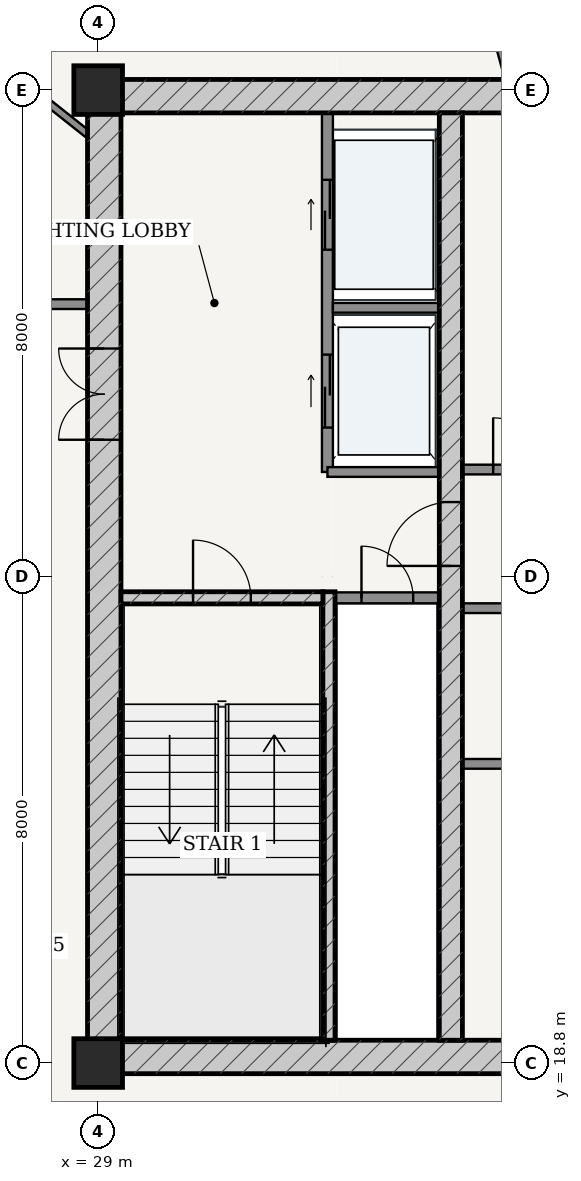
"""IFC4 building model, lengths in metres.
Left out: names, types, materials, properties, quantities, classifications, styles, units other than length and angle.
Written with IfcOpenShell. Run it as: python <this file> out.ifc"""

import sys

from ifc_helpers import new_model, si_unit, direction, frame, frame_2d, origin, origin_2d, place, context, subcontext, project, spatial, rectangle, extrude, source, transform, mapped, element, fill, save


model = new_model("IFC4")
c1 = context("Model", 3, precision=1e-05, world=origin(), true_north=direction((-0.2419218956, 0.970295726276)))
c2 = subcontext(c1, "Body", "Model", "MODEL_VIEW")
j1 = project(units=[si_unit("LENGTHUNIT", "METRE"), si_unit("PLANEANGLEUNIT", "RADIAN")], contexts=[c1])
p1 = place(None, origin())
s1 = spatial("IfcSite", under=j1, at=p1, CompositionType="ELEMENT")
p2 = place(p1, origin())
s2 = spatial("IfcBuilding", under=s1, at=p2, CompositionType="ELEMENT")
p3 = place(p2, frame((0.0, 0.0, 285.7)))
s3 = spatial("IfcBuildingStorey", under=s2, at=p3, CompositionType="ELEMENT", Elevation=285.7)
for number, where, z_axis, x_axis in (
    (1, (29.0, 18.8, 0.0), (0.0, 0.0, 1.0), (1.0, 0.0, 0.0)),
    (2, (29.0, 34.8, 0.0), (0.0, 0.0, 1.0), (1.0, 0.0, 0.0)),
):
    element("IfcColumn", number, at=place(p3, frame(where, z_axis=z_axis, x_axis=x_axis)), inside=s3, PredefinedType="COLUMN", context=c2, shape_type="SweptSolid", body=[
        extrude(rectangle(XDim=0.8, YDim=0.8, at=origin_2d()), origin(), (0.0, 0.0, 1.0), 3.75),
    ])
p4 = place(p3, frame((28.825, 18.9, 0.0), z_axis=(0.0, 0.0, 1.0), x_axis=(1.0, 0.0, 0.0)))
e3 = element("IfcWall", 3, at=p4, inside=s3, PredefinedType="SHEAR", context=c2, shape_type="SweptSolid", body=[
    extrude(rectangle(XDim=18.35, YDim=0.55, at=frame_2d((9.175, 0.0))), origin(), (0.0, 0.0, 1.0), 3.49),
])
p5 = place(p4, frame((7.41, 0.0, 0.0)))
e4 = element("IfcOpeningElement", 4, at=p5, cuts=e3, PredefinedType="OPENING", context=c2, shape_type="SweptSolid", body=[
    extrude(rectangle(XDim=0.85, YDim=2.1, at=frame_2d((0.425, 1.05))), frame((0.0, 0.285, 0.0), z_axis=(0.0, -1.0, 0.0), x_axis=(1.0, 0.0, 0.0)), (0.0, 0.0, 1.0), 0.57),
])
p6 = place(p4, frame((10.49, 0.0, 0.0)))
e5 = element("IfcOpeningElement", 5, at=p6, cuts=e3, PredefinedType="OPENING", context=c2, shape_type="SweptSolid", body=[
    extrude(rectangle(XDim=0.85, YDim=2.1, at=frame_2d((0.425, 1.05))), frame((0.0, 0.285, 0.0), z_axis=(0.0, -1.0, 0.0), x_axis=(1.0, 0.0, 0.0)), (0.0, 0.0, 1.0), 0.57),
])
p7 = place(p3, frame((28.825, 34.7, 0.0), z_axis=(0.0, 0.0, 1.0), x_axis=(1.0, 0.0, 0.0)))
e6 = element("IfcWall", 6, at=p7, inside=s3, PredefinedType="SHEAR", context=c2, shape_type="SweptSolid", body=[
    extrude(rectangle(XDim=18.35, YDim=0.55, at=frame_2d((9.175, 0.0))), origin(), (0.0, 0.0, 1.0), 3.49),
])
p8 = place(p3, frame((29.1, 19.175, 0.0), z_axis=(0.0, 0.0, 1.0), x_axis=(0.0, 1.0, 0.0)))
e7 = element("IfcWall", 7, at=p8, inside=s3, PredefinedType="SHEAR", context=c2, shape_type="SweptSolid", body=[
    extrude(rectangle(XDim=15.25, YDim=0.55, at=frame_2d((7.625, 0.0))), origin(), (0.0, 0.0, 1.0), 3.49),
])
p9 = place(p8, frame((9.875, 0.0, 0.0)))
e8 = element("IfcOpeningElement", 8, at=p9, cuts=e7, PredefinedType="OPENING", context=c2, shape_type="SweptSolid", body=[
    extrude(rectangle(XDim=1.5, YDim=2.2, at=frame_2d((0.75, 1.1))), frame((0.0, 0.285, 0.0), z_axis=(0.0, -1.0, 0.0), x_axis=(1.0, 0.0, 0.0)), (0.0, 0.0, 1.0), 0.57),
])
p10 = place(p3, frame((32.795, 19.175, 0.0), z_axis=(0.0, 0.0, 1.0), x_axis=(0.0, 1.0, 0.0)))
e9 = element("IfcWall", 9, at=p10, inside=s3, PredefinedType="SOLIDWALL", context=c2, shape_type="SweptSolid", body=[
    extrude(rectangle(XDim=7.375, YDim=0.2, at=frame_2d((3.688, 0.0))), origin(), (0.0, 0.0, 1.0), 3.49),
])
p11 = place(p3, frame((29.375, 26.45, 0.0), z_axis=(0.0, 0.0, 1.0), x_axis=(1.0, 0.0, 0.0)))
e10 = element("IfcWall", 10, at=p11, inside=s3, PredefinedType="SOLIDWALL", context=c2, shape_type="SweptSolid", body=[
    extrude(rectangle(XDim=3.32, YDim=0.2, at=frame_2d((1.66, 0.0))), origin(), (0.0, 0.0, 1.0), 3.49),
])
p12 = place(p11, frame((1.185, 0.0, 0.0)))
e11 = element("IfcOpeningElement", 11, at=p12, cuts=e10, PredefinedType="OPENING", context=c2, shape_type="SweptSolid", body=[
    extrude(rectangle(XDim=0.95, YDim=2.15, at=frame_2d((0.475, 1.075))), frame((0.0, 0.11, 0.0), z_axis=(0.0, -1.0, 0.0), x_axis=(1.0, 0.0, 0.0)), (0.0, 0.0, 1.0), 0.22),
])
p13 = place(p3, frame((34.8, 19.175, 0.0), z_axis=(0.0, 0.0, 1.0), x_axis=(0.0, 1.0, 0.0)))
e12 = element("IfcWall", 12, at=p13, inside=s3, PredefinedType="SHEAR", context=c2, shape_type="SweptSolid", body=[
    extrude(rectangle(XDim=15.25, YDim=0.38, at=frame_2d((7.625, 0.0))), origin(), (0.0, 0.0, 1.0), 3.49),
])
p14 = place(p13, frame((7.8, 0.0, 0.0)))
e13 = element("IfcOpeningElement", 13, at=p14, cuts=e12, PredefinedType="OPENING", context=c2, shape_type="SweptSolid", body=[
    extrude(rectangle(XDim=1.05, YDim=2.15, at=frame_2d((0.525, 1.075))), frame((0.0, 0.2, 0.0), z_axis=(0.0, -1.0, 0.0), x_axis=(1.0, 0.0, 0.0)), (0.0, 0.0, 1.0), 0.4),
])
p15 = place(p3, frame((32.9, 26.45, 0.0), z_axis=(0.0, 0.0, 1.0), x_axis=(1.0, 0.0, 0.0)))
e14 = element("IfcWall", 14, at=p15, inside=s3, PredefinedType="PARTITIONING", context=c2, shape_type="SweptSolid", body=[
    extrude(rectangle(XDim=1.71, YDim=0.18, at=frame_2d((0.855, 0.0))), origin(), (0.0, 0.0, 1.0), 3.49),
])
p16 = place(p15, frame((0.43, 0.0, 0.0)))
e15 = element("IfcOpeningElement", 15, at=p16, cuts=e14, PredefinedType="OPENING", context=c2, shape_type="SweptSolid", body=[
    extrude(rectangle(XDim=0.85, YDim=2.1, at=frame_2d((0.425, 1.05))), frame((0.0, 0.1, 0.0), z_axis=(0.0, -1.0, 0.0), x_axis=(1.0, 0.0, 0.0)), (0.0, 0.0, 1.0), 0.2),
])
p17 = place(p3, frame((32.77, 28.52, 0.0), z_axis=(0.0, 0.0, 1.0), x_axis=(0.0, 1.0, 0.0)))
e16 = element("IfcWall", 16, at=p17, inside=s3, PredefinedType="PARTITIONING", context=c2, shape_type="SweptSolid", body=[
    extrude(rectangle(XDim=5.905, YDim=0.18, at=frame_2d((2.953, 0.0))), origin(), (0.0, 0.0, 1.0), 3.49),
])
p18 = place(p17, frame((3.655, 0.0, 0.0)))
e17 = element("IfcOpeningElement", 17, at=p18, cuts=e16, PredefinedType="OPENING", context=c2, shape_type="SweptSolid", body=[
    extrude(rectangle(XDim=1.15, YDim=2.2, at=frame_2d((0.575, 1.1))), frame((0.0, 0.1, 0.0), z_axis=(0.0, -1.0, 0.0), x_axis=(1.0, 0.0, 0.0)), (0.0, 0.0, 1.0), 0.2),
])
p19 = place(p17, frame((0.73, 0.0, 0.0)))
e18 = element("IfcOpeningElement", 18, at=p19, cuts=e16, PredefinedType="OPENING", context=c2, shape_type="SweptSolid", body=[
    extrude(rectangle(XDim=1.2, YDim=2.25, at=frame_2d((0.6, 1.125))), frame((0.0, 0.1, 0.0), z_axis=(0.0, -1.0, 0.0), x_axis=(1.0, 0.0, 0.0)), (0.0, 0.0, 1.0), 0.2),
])
p20 = place(p3, frame((32.86, 31.22, 0.0), z_axis=(0.0, 0.0, 1.0), x_axis=(1.0, 0.0, 0.0)))
e19 = element("IfcWall", 19, at=p20, inside=s3, PredefinedType="PARTITIONING", context=c2, shape_type="SweptSolid", body=[
    extrude(rectangle(XDim=1.75, YDim=0.16, at=frame_2d((0.875, 0.0))), origin(), (0.0, 0.0, 1.0), 3.49),
])
p21 = place(p3, frame((32.77, 28.52, 0.0), z_axis=(0.0, 0.0, 1.0), x_axis=(1.0, 0.0, 0.0)))
e20 = element("IfcWall", 20, at=p21, inside=s3, PredefinedType="PARTITIONING", context=c2, shape_type="SweptSolid", body=[
    extrude(rectangle(XDim=1.84, YDim=0.16, at=frame_2d((0.92, 0.0))), origin(), (0.0, 0.0, 1.0), 3.49),
])
p22 = place(p3, frame((34.99, 28.56, 0.0), z_axis=(0.0, 0.0, 1.0), x_axis=(1.0, 0.0, 0.0)))
e21 = element("IfcWall", 21, at=p22, inside=s3, PredefinedType="PARTITIONING", context=c2, shape_type="SweptSolid", body=[
    extrude(rectangle(XDim=6.02, YDim=0.16, at=frame_2d((3.01, 0.0))), origin(), (0.0, 0.0, 1.0), 3.49),
])
p23 = place(p22, frame((0.505, 0.0, 0.0)))
e22 = element("IfcOpeningElement", 22, at=p23, cuts=e21, PredefinedType="OPENING", context=c2, shape_type="SweptSolid", body=[
    extrude(rectangle(XDim=0.85, YDim=2.1, at=frame_2d((0.425, 1.05))), frame((0.0, 0.09, 0.0), z_axis=(0.0, -1.0, 0.0), x_axis=(1.0, 0.0, 0.0)), (0.0, 0.0, 1.0), 0.18),
])
p24 = place(p22, frame((2.58, 0.0, 0.0)))
e23 = element("IfcOpeningElement", 23, at=p24, cuts=e21, PredefinedType="OPENING", context=c2, shape_type="SweptSolid", body=[
    extrude(rectangle(XDim=0.86, YDim=2.1, at=frame_2d((0.43, 1.05))), frame((0.0, 0.09, 0.0), z_axis=(0.0, -1.0, 0.0), x_axis=(1.0, 0.0, 0.0)), (0.0, 0.0, 1.0), 0.18),
])
p25 = place(p22, frame((4.665, 0.0, 0.0)))
e24 = element("IfcOpeningElement", 24, at=p25, cuts=e21, PredefinedType="OPENING", context=c2, shape_type="SweptSolid", body=[
    extrude(rectangle(XDim=0.85, YDim=2.1, at=frame_2d((0.425, 1.05))), frame((0.0, 0.09, 0.0), z_axis=(0.0, -1.0, 0.0), x_axis=(1.0, 0.0, 0.0)), (0.0, 0.0, 1.0), 0.18),
])
p26 = place(p3, frame((34.99, 26.28, 0.0), z_axis=(0.0, 0.0, 1.0), x_axis=(1.0, 0.0, 0.0)))
e25 = element("IfcWall", 25, at=p26, inside=s3, PredefinedType="PARTITIONING", context=c2, shape_type="SweptSolid", body=[
    extrude(rectangle(XDim=6.02, YDim=0.16, at=frame_2d((3.01, 0.0))), origin(), (0.0, 0.0, 1.0), 3.49),
])
p27 = place(p26, frame((1.045, 0.0, 0.0)))
e26 = element("IfcOpeningElement", 26, at=p27, cuts=e25, PredefinedType="OPENING", context=c2, shape_type="SweptSolid", body=[
    extrude(rectangle(XDim=0.85, YDim=2.1, at=frame_2d((0.425, 1.05))), frame((0.0, 0.09, 0.0), z_axis=(0.0, -1.0, 0.0), x_axis=(1.0, 0.0, 0.0)), (0.0, 0.0, 1.0), 0.18),
])
p28 = place(p26, frame((3.215, 0.0, 0.0)))
e27 = element("IfcOpeningElement", 27, at=p28, cuts=e25, PredefinedType="OPENING", context=c2, shape_type="SweptSolid", body=[
    extrude(rectangle(XDim=1.1, YDim=2.2, at=frame_2d((0.55, 1.1))), frame((0.0, 0.09, 0.0), z_axis=(0.0, -1.0, 0.0), x_axis=(1.0, 0.0, 0.0)), (0.0, 0.0, 1.0), 0.18),
])
p29 = place(p26, frame((4.695, 0.0, 0.0)))
e28 = element("IfcOpeningElement", 28, at=p29, cuts=e25, PredefinedType="OPENING", context=c2, shape_type="SweptSolid", body=[
    extrude(rectangle(XDim=1.1, YDim=2.2, at=frame_2d((0.55, 1.1))), frame((0.0, 0.09, 0.0), z_axis=(0.0, -1.0, 0.0), x_axis=(1.0, 0.0, 0.0)), (0.0, 0.0, 1.0), 0.18),
])
p30 = place(p3, frame((34.99, 23.72, 0.0), z_axis=(0.0, 0.0, 1.0), x_axis=(1.0, 0.0, 0.0)))
e29 = element("IfcWall", 29, at=p30, inside=s3, PredefinedType="PARTITIONING", context=c2, shape_type="SweptSolid", body=[
    extrude(rectangle(XDim=6.02, YDim=0.16, at=frame_2d((3.01, 0.0))), origin(), (0.0, 0.0, 1.0), 3.49),
])
p31 = place(p3, frame((26.895, 31.28, 0.0), z_axis=(0.0, 0.0, 1.0), x_axis=(1.0, 0.0, 0.0)))
e30 = element("IfcWall", 30, at=p31, inside=s3, PredefinedType="PARTITIONING", context=c2, shape_type="SweptSolid", body=[
    extrude(rectangle(XDim=1.93, YDim=0.16, at=frame_2d((0.965, 0.0))), origin(), (0.0, 0.0, 1.0), 3.49),
])
p32 = place(p3, frame((35.751, 34.977, 0.0), z_axis=(0.0, 0.0, 1.0), x_axis=(-0.26521778697, 0.964188532122, 0.0)))
e31 = element("IfcWall", 31, at=p32, inside=s3, PredefinedType="PARTITIONING", context=c2, shape_type="SweptSolid", body=[
    extrude(rectangle(XDim=2.684, YDim=0.12, at=frame_2d((1.342, 0.0))), origin(), (0.0, 0.0, 1.0), 2.575),
])
p33 = place(p3, frame((28.825, 34.077, 0.0), z_axis=(0.0, 0.0, 1.0), x_axis=(-0.783444596274, 0.621461635637, 0.0)))
e32 = element("IfcWall", 32, at=p33, inside=s3, PredefinedType="PARTITIONING", context=c2, shape_type="SweptSolid", body=[
    extrude(rectangle(XDim=3.32, YDim=0.12, at=frame_2d((1.66, 0.0))), origin(), (0.0, 0.0, 1.0), 3.209),
])
m1 = source(origin(), c2, "Body", "SweptSolid", [
    extrude(rectangle(XDim=1.5, YDim=2.2, at=frame_2d((0.75, 1.1))), frame((0.0, 0.025, 0.0), z_axis=(0.0, -1.0, 0.0), x_axis=(1.0, 0.0, 0.0)), (0.0, 0.0, 1.0), 0.05),
])
p34 = place(p9, origin())
e33 = element("IfcDoor", 33, at=p34, inside=s3, OperationType="DOUBLE_DOOR_SINGLE_SWING", PredefinedType="DOOR", context=c2, shape_type="MappedRepresentation", body=[
    mapped(m1, transform((0.0, 0.0, 0.0), scale=1.0)),
])
fill(e8, e33)
m2 = source(origin(), c2, "Body", "SweptSolid", [
    extrude(rectangle(XDim=1.05, YDim=2.15, at=frame_2d((0.525, 1.075))), frame((0.0, 0.025, 0.0), z_axis=(0.0, -1.0, 0.0), x_axis=(1.0, 0.0, 0.0)), (0.0, 0.0, 1.0), 0.05),
])
p35 = place(p14, origin())
e34 = element("IfcDoor", 34, at=p35, inside=s3, OperationType="SINGLE_SWING_LEFT", PredefinedType="DOOR", context=c2, shape_type="MappedRepresentation", body=[
    mapped(m2, transform((0.0, 0.0, 0.0), scale=1.0)),
])
fill(e13, e34)
m3 = source(origin(), c2, "Body", "SweptSolid", [
    extrude(rectangle(XDim=0.95, YDim=2.15, at=frame_2d((0.475, 1.075))), frame((0.0, 0.025, 0.0), z_axis=(0.0, -1.0, 0.0), x_axis=(1.0, 0.0, 0.0)), (0.0, 0.0, 1.0), 0.05),
])
p36 = place(p12, origin())
e35 = element("IfcDoor", 35, at=p36, inside=s3, OperationType="SINGLE_SWING_LEFT", PredefinedType="DOOR", context=c2, shape_type="MappedRepresentation", body=[
    mapped(m3, transform((0.0, 0.0, 0.0), scale=1.0)),
])
fill(e11, e35)
m4 = source(origin(), c2, "Body", "SweptSolid", [
    extrude(rectangle(XDim=0.85, YDim=2.1, at=frame_2d((0.425, 1.05))), frame((0.0, 0.025, 0.0), z_axis=(0.0, -1.0, 0.0), x_axis=(1.0, 0.0, 0.0)), (0.0, 0.0, 1.0), 0.05),
])
p37 = place(p16, origin())
e36 = element("IfcDoor", 36, at=p37, inside=s3, OperationType="SINGLE_SWING_LEFT", PredefinedType="DOOR", context=c2, shape_type="MappedRepresentation", body=[
    mapped(m4, transform((0.0, 0.0, 0.0), scale=1.0)),
])
fill(e15, e36)
p38 = place(p23, origin())
e37 = element("IfcDoor", 37, at=p38, inside=s3, OperationType="SINGLE_SWING_LEFT", PredefinedType="DOOR", context=c2, shape_type="MappedRepresentation", body=[
    mapped(m4, transform((0.0, 0.0, 0.0), scale=1.0)),
])
fill(e22, e37)
m5 = source(origin(), c2, "Body", "SweptSolid", [
    extrude(rectangle(XDim=1.15, YDim=2.2, at=frame_2d((0.575, 1.1))), frame((0.0, 0.025, 0.0), z_axis=(0.0, -1.0, 0.0), x_axis=(1.0, 0.0, 0.0)), (0.0, 0.0, 1.0), 0.05),
])
p39 = place(p18, origin())
e38 = element("IfcDoor", 38, at=p39, inside=s3, OperationType="DOUBLE_DOOR_SLIDING", PredefinedType="DOOR", context=c2, shape_type="MappedRepresentation", body=[
    mapped(m5, transform((0.0, 0.0, 0.0), scale=1.0)),
])
fill(e17, e38)
m6 = source(origin(), c2, "Body", "SweptSolid", [
    extrude(rectangle(XDim=1.2, YDim=2.25, at=frame_2d((0.6, 1.125))), frame((0.0, 0.025, 0.0), z_axis=(0.0, -1.0, 0.0), x_axis=(1.0, 0.0, 0.0)), (0.0, 0.0, 1.0), 0.05),
])
p40 = place(p19, origin())
e39 = element("IfcDoor", 39, at=p40, inside=s3, OperationType="DOUBLE_DOOR_SLIDING", PredefinedType="DOOR", context=c2, shape_type="MappedRepresentation", body=[
    mapped(m6, transform((0.0, 0.0, 0.0), scale=1.0)),
])
fill(e18, e39)
save(model, sys.argv[1])
